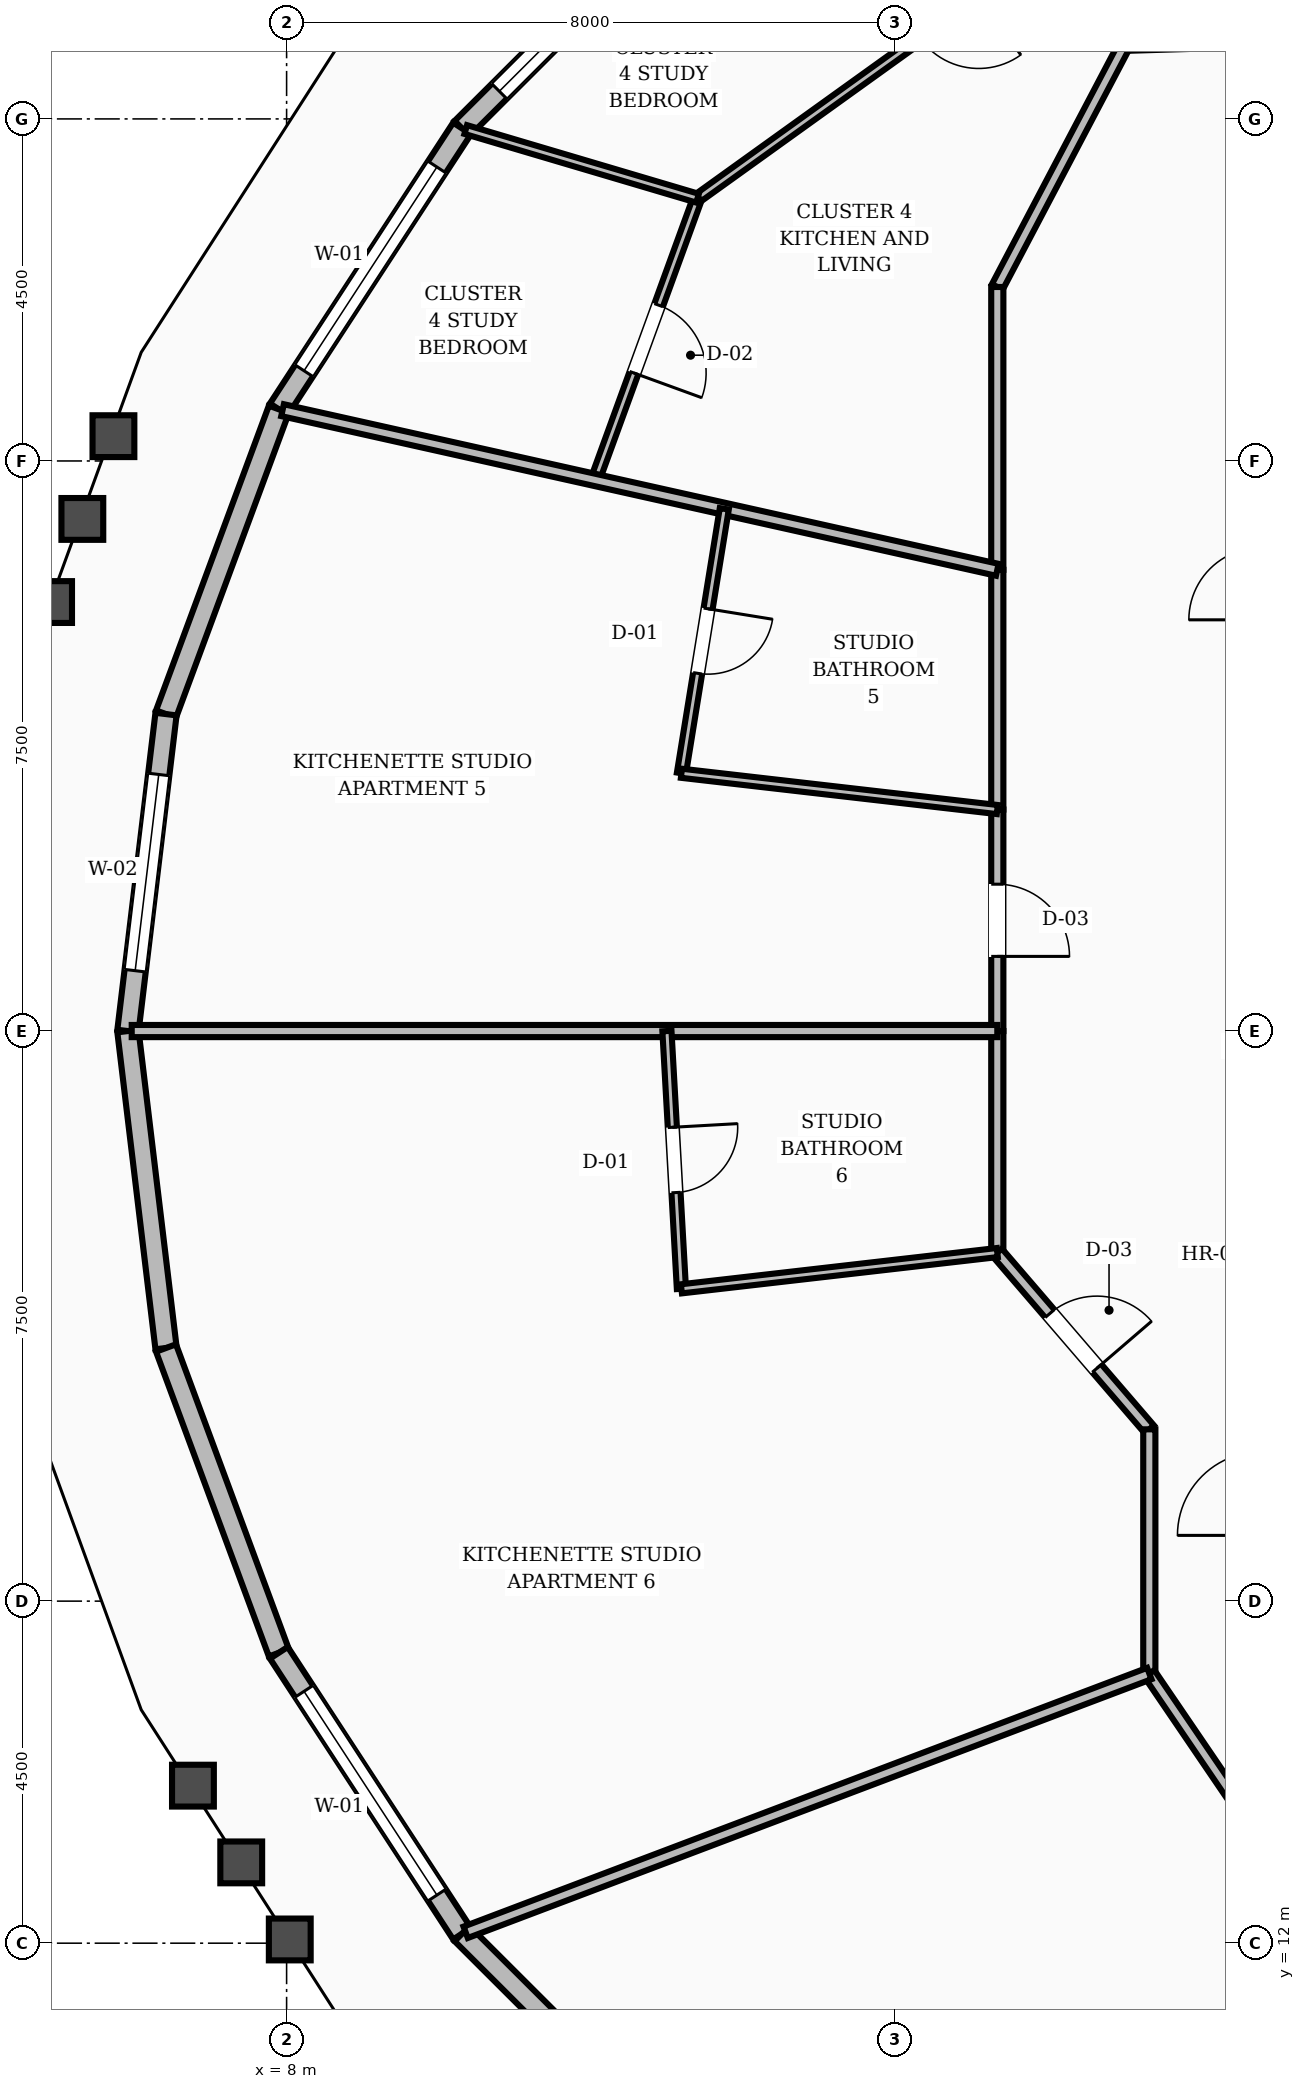
"""IFC4 building model, lengths in metres.
Left out: names, types, materials, properties, quantities, classifications, styles, units other than length and angle.
Written with IfcOpenShell. Run it as: python <this file> out.ifc"""

import sys

from ifc_helpers import new_model, si_unit, direction, frame, frame_2d, origin, place, context, subcontext, project, spatial, rectangle, extrude, element, fill, save


model = new_model("IFC4")
c1 = context("Model", 3, precision=1e-05, world=origin(), true_north=direction((0.0, 1.0)))
c2 = subcontext(c1, "Body", "Model", "MODEL_VIEW")
j1 = project(units=[si_unit("LENGTHUNIT", "METRE"), si_unit("PLANEANGLEUNIT", "RADIAN")], contexts=[c1])
p1 = place(None, origin())
s1 = spatial("IfcSite", under=j1, at=p1, CompositionType="ELEMENT")
p2 = place(p1, origin())
s2 = spatial("IfcBuilding", under=s1, at=p2, CompositionType="ELEMENT")
p3 = place(p2, frame((0.0, 0.0, 171.2)))
s3 = spatial("IfcBuildingStorey", under=s2, at=p3, CompositionType="ELEMENT", Elevation=171.2)
p4 = place(p3, frame((13.553, 39.113, 0.0), z_axis=(0.0, 0.0, 1.0), x_axis=(-0.707692376563, -0.706520700443, 0.0)))
e1 = element("IfcWall", 1, at=p4, inside=s3, PredefinedType="STANDARD", context=c2, shape_type="SweptSolid", body=[
    extrude(rectangle(XDim=4.584, YDim=0.28, at=frame_2d((2.292, 0.0))), origin(), (0.0, 0.0, 1.0), 2.82),
])
p5 = place(p4, frame((0.692, 0.0, 0.8)))
e2 = element("IfcOpeningElement", 2, at=p5, cuts=e1, PredefinedType="OPENING", context=c2, shape_type="SweptSolid", body=[
    extrude(rectangle(XDim=3.2, YDim=1.65, at=frame_2d((1.6, 0.825))), frame((0.0, 0.15, 0.0), z_axis=(0.0, -1.0, 0.0), x_axis=(1.0, 0.0, 0.0)), (0.0, 0.0, 1.0), 0.3),
])
p6 = place(p3, frame((10.309, 35.875, 0.0), z_axis=(0.0, 0.0, 1.0), x_axis=(-0.546411241489, -0.837517017841, 0.0)))
e3 = element("IfcWall", 3, at=p6, inside=s3, PredefinedType="STANDARD", context=c2, shape_type="SweptSolid", body=[
    extrude(rectangle(XDim=4.412, YDim=0.28, at=frame_2d((2.206, 0.0))), origin(), (0.0, 0.0, 1.0), 2.82),
])
p7 = place(p6, frame((0.606, 0.0, 0.8)))
e4 = element("IfcOpeningElement", 4, at=p7, cuts=e3, PredefinedType="OPENING", context=c2, shape_type="SweptSolid", body=[
    extrude(rectangle(XDim=3.2, YDim=1.65, at=frame_2d((1.6, 0.825))), frame((0.0, 0.15, 0.0), z_axis=(0.0, -1.0, 0.0), x_axis=(1.0, 0.0, 0.0)), (0.0, 0.0, 1.0), 0.3),
])
p8 = place(p3, frame((7.898, 32.179, 0.0), z_axis=(0.0, 0.0, 1.0), x_axis=(-0.347202759563, -0.937790085121, 0.0)))
e5 = element("IfcWall", 5, at=p8, inside=s3, PredefinedType="STANDARD", context=c2, shape_type="SweptSolid", body=[
    extrude(rectangle(XDim=4.275, YDim=0.28, at=frame_2d((2.138, 0.0))), origin(), (0.0, 0.0, 1.0), 2.82),
])
p9 = place(p3, frame((6.414, 28.17, 0.0), z_axis=(0.0, 0.0, 1.0), x_axis=(-0.119397354427, -0.992846549954, 0.0)))
e6 = element("IfcWall", 6, at=p9, inside=s3, PredefinedType="STANDARD", context=c2, shape_type="SweptSolid", body=[
    extrude(rectangle(XDim=4.2, YDim=0.28, at=frame_2d((2.1, 0.0))), origin(), (0.0, 0.0, 1.0), 2.82),
])
p10 = place(p9, frame((0.8, 0.0, 0.8)))
e7 = element("IfcOpeningElement", 7, at=p10, cuts=e6, PredefinedType="OPENING", context=c2, shape_type="SweptSolid", body=[
    extrude(rectangle(XDim=2.6, YDim=1.65, at=frame_2d((1.3, 0.825))), frame((0.0, 0.15, 0.0), z_axis=(0.0, -1.0, 0.0), x_axis=(1.0, 0.0, 0.0)), (0.0, 0.0, 1.0), 0.3),
])
p11 = place(p3, frame((5.912, 24.0, 0.0), z_axis=(0.0, 0.0, 1.0), x_axis=(0.119397354427, -0.992846549954, 0.0)))
e8 = element("IfcWall", 8, at=p11, inside=s3, PredefinedType="STANDARD", context=c2, shape_type="SweptSolid", body=[
    extrude(rectangle(XDim=4.2, YDim=0.28, at=frame_2d((2.1, 0.0))), origin(), (0.0, 0.0, 1.0), 2.82),
])
p12 = place(p3, frame((6.414, 19.83, 0.0), z_axis=(0.0, 0.0, 1.0), x_axis=(0.347202759563, -0.937790085121, 0.0)))
e9 = element("IfcWall", 9, at=p12, inside=s3, PredefinedType="STANDARD", context=c2, shape_type="SweptSolid", body=[
    extrude(rectangle(XDim=4.275, YDim=0.28, at=frame_2d((2.138, 0.0))), origin(), (0.0, 0.0, 1.0), 2.82),
])
p13 = place(p3, frame((7.898, 15.821, 0.0), z_axis=(0.0, 0.0, 1.0), x_axis=(0.546411241489, -0.837517017841, 0.0)))
e10 = element("IfcWall", 10, at=p13, inside=s3, PredefinedType="STANDARD", context=c2, shape_type="SweptSolid", body=[
    extrude(rectangle(XDim=4.412, YDim=0.28, at=frame_2d((2.206, 0.0))), origin(), (0.0, 0.0, 1.0), 2.82),
])
p14 = place(p13, frame((0.606, 0.0, 0.8)))
e11 = element("IfcOpeningElement", 11, at=p14, cuts=e10, PredefinedType="OPENING", context=c2, shape_type="SweptSolid", body=[
    extrude(rectangle(XDim=3.2, YDim=1.65, at=frame_2d((1.6, 0.825))), frame((0.0, 0.15, 0.0), z_axis=(0.0, -1.0, 0.0), x_axis=(1.0, 0.0, 0.0)), (0.0, 0.0, 1.0), 0.3),
])
p15 = place(p3, frame((10.309, 12.125, 0.0), z_axis=(0.0, 0.0, 1.0), x_axis=(0.707692376563, -0.706520700443, 0.0)))
e12 = element("IfcWall", 12, at=p15, inside=s3, PredefinedType="STANDARD", context=c2, shape_type="SweptSolid", body=[
    extrude(rectangle(XDim=4.584, YDim=0.28, at=frame_2d((2.292, 0.0))), origin(), (0.0, 0.0, 1.0), 2.82),
])
p16 = place(p3, frame((19.025, 36.975, 0.0), z_axis=(0.0, 0.0, 1.0), x_axis=(-0.46527115782, -0.885168204185, 0.0)))
e13 = element("IfcWall", 13, at=p16, inside=s3, PredefinedType="SOLIDWALL", context=c2, shape_type="SweptSolid", body=[
    extrude(rectangle(XDim=3.6, YDim=0.16, at=frame_2d((1.8, 0.0))), origin(), (0.0, 0.0, 1.0), 2.8),
])
p17 = place(p3, frame((17.35, 33.789, 0.0), z_axis=(0.0, 0.0, 1.0), x_axis=(0.0, -1.0, 0.0)))
e14 = element("IfcWall", 14, at=p17, inside=s3, PredefinedType="SOLIDWALL", context=c2, shape_type="SweptSolid", body=[
    extrude(rectangle(XDim=3.721, YDim=0.16, at=frame_2d((1.86, 0.0))), origin(), (0.0, 0.0, 1.0), 2.8),
])
p18 = place(p3, frame((17.35, 30.068, 0.0), z_axis=(0.0, 0.0, 1.0), x_axis=(0.0, -1.0, 0.0)))
e15 = element("IfcWall", 15, at=p18, inside=s3, PredefinedType="SOLIDWALL", context=c2, shape_type="SweptSolid", body=[
    extrude(rectangle(XDim=3.154, YDim=0.16, at=frame_2d((1.577, 0.0))), origin(), (0.0, 0.0, 1.0), 2.8),
])
p19 = place(p3, frame((17.35, 26.914, 0.0), z_axis=(0.0, 0.0, 1.0), x_axis=(0.0, -1.0, 0.0)))
e16 = element("IfcWall", 16, at=p19, inside=s3, PredefinedType="SOLIDWALL", context=c2, shape_type="SweptSolid", body=[
    extrude(rectangle(XDim=2.914, YDim=0.16, at=frame_2d((1.457, 0.0))), origin(), (0.0, 0.0, 1.0), 2.8),
])
p20 = place(p19, frame((0.982, 0.0, 0.0)))
e17 = element("IfcOpeningElement", 17, at=p20, cuts=e16, PredefinedType="OPENING", context=c2, shape_type="SweptSolid", body=[
    extrude(rectangle(XDim=0.95, YDim=2.1, at=frame_2d((0.475, 1.05))), frame((0.0, 0.09, 0.0), z_axis=(0.0, -1.0, 0.0), x_axis=(1.0, 0.0, 0.0)), (0.0, 0.0, 1.0), 0.18),
])
p21 = place(p3, frame((17.35, 24.0, 0.0), z_axis=(0.0, 0.0, 1.0), x_axis=(0.0, -1.0, 0.0)))
e18 = element("IfcWall", 18, at=p21, inside=s3, PredefinedType="SOLIDWALL", context=c2, shape_type="SweptSolid", body=[
    extrude(rectangle(XDim=2.914, YDim=0.16, at=frame_2d((1.457, 0.0))), origin(), (0.0, 0.0, 1.0), 2.8),
])
p22 = place(p3, frame((17.35, 21.086, 0.0), z_axis=(0.0, 0.0, 1.0), x_axis=(0.652022797448, -0.758199361388, 0.0)))
e19 = element("IfcWall", 19, at=p22, inside=s3, PredefinedType="SOLIDWALL", context=c2, shape_type="SweptSolid", body=[
    extrude(rectangle(XDim=3.067, YDim=0.16, at=frame_2d((1.534, 0.0))), origin(), (0.0, 0.0, 1.0), 2.8),
])
p23 = place(p22, frame((1.059, 0.0, 0.0)))
e20 = element("IfcOpeningElement", 20, at=p23, cuts=e19, PredefinedType="OPENING", context=c2, shape_type="SweptSolid", body=[
    extrude(rectangle(XDim=0.95, YDim=2.1, at=frame_2d((0.475, 1.05))), frame((0.0, 0.09, 0.0), z_axis=(0.0, -1.0, 0.0), x_axis=(1.0, 0.0, 0.0)), (0.0, 0.0, 1.0), 0.18),
])
p24 = place(p3, frame((19.35, 18.76, 0.0), z_axis=(0.0, 0.0, 1.0), x_axis=(0.0, -1.0, 0.0)))
e21 = element("IfcWall", 21, at=p24, inside=s3, PredefinedType="SOLIDWALL", context=c2, shape_type="SweptSolid", body=[
    extrude(rectangle(XDim=3.213, YDim=0.16, at=frame_2d((1.606, 0.0))), origin(), (0.0, 0.0, 1.0), 2.8),
])
p25 = place(p3, frame((19.35, 15.548, 0.0), z_axis=(0.0, 0.0, 1.0), x_axis=(0.562674669208, -0.826678423955, 0.0)))
e22 = element("IfcWall", 22, at=p25, inside=s3, PredefinedType="SOLIDWALL", context=c2, shape_type="SweptSolid", body=[
    extrude(rectangle(XDim=3.021, YDim=0.16, at=frame_2d((1.511, 0.0))), origin(), (0.0, 0.0, 1.0), 2.8),
])
p26 = place(p3, frame((20.032, 39.716, 0.0), z_axis=(0.0, 0.0, 1.0), x_axis=(-0.812167375512, -0.58342450596, 0.0)))
e23 = element("IfcWall", 23, at=p26, inside=s3, PredefinedType="PARTITIONING", context=c2, shape_type="SweptSolid", body=[
    extrude(rectangle(XDim=8.157, YDim=0.12, at=frame_2d((4.079, 0.0))), origin(), (0.0, 0.0, 1.0), 2.8),
])
p27 = place(p26, frame((3.604, 0.0, 0.0)))
e24 = element("IfcOpeningElement", 24, at=p27, cuts=e23, PredefinedType="OPENING", context=c2, shape_type="SweptSolid", body=[
    extrude(rectangle(XDim=0.95, YDim=2.1, at=frame_2d((0.475, 1.05))), frame((0.0, 0.07, 0.0), z_axis=(0.0, -1.0, 0.0), x_axis=(1.0, 0.0, 0.0)), (0.0, 0.0, 1.0), 0.14),
])
p28 = place(p3, frame((13.407, 34.957, 0.0), z_axis=(0.0, 0.0, 1.0), x_axis=(-0.342269779856, -0.939601722964, 0.0)))
e25 = element("IfcWall", 25, at=p28, inside=s3, PredefinedType="PARTITIONING", context=c2, shape_type="SweptSolid", body=[
    extrude(rectangle(XDim=3.945, YDim=0.12, at=frame_2d((1.972, 0.0))), origin(), (0.0, 0.0, 1.0), 2.8),
])
p29 = place(p28, frame((1.497, 0.0, 0.0)))
e26 = element("IfcOpeningElement", 26, at=p29, cuts=e25, PredefinedType="OPENING", context=c2, shape_type="SweptSolid", body=[
    extrude(rectangle(XDim=0.95, YDim=2.1, at=frame_2d((0.475, 1.05))), frame((0.0, 0.07, 0.0), z_axis=(0.0, -1.0, 0.0), x_axis=(1.0, 0.0, 0.0)), (0.0, 0.0, 1.0), 0.14),
])
p30 = place(p3, frame((13.407, 34.957, 0.0), z_axis=(0.0, 0.0, 1.0), x_axis=(-0.958817465397, 0.284023006198, 0.0)))
e27 = element("IfcWall", 27, at=p30, inside=s3, PredefinedType="PARTITIONING", context=c2, shape_type="SweptSolid", body=[
    extrude(rectangle(XDim=3.181, YDim=0.12, at=frame_2d((1.591, 0.0))), origin(), (0.0, 0.0, 1.0), 2.8),
])
p31 = place(p3, frame((17.35, 30.068, 0.0), z_axis=(0.0, 0.0, 1.0), x_axis=(-0.975950982727, 0.217990089947, 0.0)))
e28 = element("IfcWall", 28, at=p31, inside=s3, PredefinedType="SOLIDWALL", context=c2, shape_type="SweptSolid", body=[
    extrude(rectangle(XDim=9.635, YDim=0.16, at=frame_2d((4.817, 0.0))), origin(), (0.0, 0.0, 1.0), 2.8),
])
p32 = place(p3, frame((13.758, 30.87, 0.0), z_axis=(0.0, 0.0, 1.0), x_axis=(-0.160083927962, -0.987103406948, 0.0)))
e29 = element("IfcWall", 29, at=p32, inside=s3, PredefinedType="PARTITIONING", context=c2, shape_type="SweptSolid", body=[
    extrude(rectangle(XDim=3.524, YDim=0.12, at=frame_2d((1.762, 0.0))), origin(), (0.0, 0.0, 1.0), 2.8),
])
p33 = place(p32, frame((1.332, 0.0, 0.0)))
e30 = element("IfcOpeningElement", 30, at=p33, cuts=e29, PredefinedType="OPENING", context=c2, shape_type="SweptSolid", body=[
    extrude(rectangle(XDim=0.86, YDim=2.1, at=frame_2d((0.43, 1.05))), frame((0.0, 0.07, 0.0), z_axis=(0.0, -1.0, 0.0), x_axis=(1.0, 0.0, 0.0)), (0.0, 0.0, 1.0), 0.14),
])
p34 = place(p3, frame((17.35, 26.914, 0.0), z_axis=(0.0, 0.0, 1.0), x_axis=(-0.993469881573, 0.114094673, 0.0)))
e31 = element("IfcWall", 31, at=p34, inside=s3, PredefinedType="PARTITIONING", context=c2, shape_type="SweptSolid", body=[
    extrude(rectangle(XDim=4.183, YDim=0.12, at=frame_2d((2.092, 0.0))), origin(), (0.0, 0.0, 1.0), 2.8),
])
p35 = place(p3, frame((17.35, 24.0, 0.0), z_axis=(0.0, 0.0, 1.0), x_axis=(-1.0, 0.0, 0.0)))
e32 = element("IfcWall", 32, at=p35, inside=s3, PredefinedType="SOLIDWALL", context=c2, shape_type="SweptSolid", body=[
    extrude(rectangle(XDim=11.388, YDim=0.16, at=frame_2d((5.694, 0.0))), origin(), (0.0, 0.0, 1.0), 2.8),
])
p36 = place(p3, frame((13.004, 24.0, 0.0), z_axis=(0.0, 0.0, 1.0), x_axis=(0.056063151341, -0.99842722472, 0.0)))
e33 = element("IfcWall", 33, at=p36, inside=s3, PredefinedType="PARTITIONING", context=c2, shape_type="SweptSolid", body=[
    extrude(rectangle(XDim=3.397, YDim=0.12, at=frame_2d((1.698, 0.0))), origin(), (0.0, 0.0, 1.0), 2.8),
])
p37 = place(p36, frame((1.268, 0.0, 0.0)))
e34 = element("IfcOpeningElement", 34, at=p37, cuts=e33, PredefinedType="OPENING", context=c2, shape_type="SweptSolid", body=[
    extrude(rectangle(XDim=0.86, YDim=2.1, at=frame_2d((0.43, 1.05))), frame((0.0, 0.07, 0.0), z_axis=(0.0, -1.0, 0.0), x_axis=(1.0, 0.0, 0.0)), (0.0, 0.0, 1.0), 0.14),
])
p38 = place(p3, frame((17.35, 21.086, 0.0), z_axis=(0.0, 0.0, 1.0), x_axis=(-0.993469881573, -0.114094673, 0.0)))
e35 = element("IfcWall", 35, at=p38, inside=s3, PredefinedType="PARTITIONING", context=c2, shape_type="SweptSolid", body=[
    extrude(rectangle(XDim=4.183, YDim=0.12, at=frame_2d((2.092, 0.0))), origin(), (0.0, 0.0, 1.0), 2.8),
])
p39 = place(p3, frame((19.35, 15.548, 0.0), z_axis=(0.0, 0.0, 1.0), x_axis=(-0.935251280016, -0.353984523996, 0.0)))
e36 = element("IfcWall", 36, at=p39, inside=s3, PredefinedType="SOLIDWALL", context=c2, shape_type="SweptSolid", body=[
    extrude(rectangle(XDim=9.617, YDim=0.16, at=frame_2d((4.809, 0.0))), origin(), (0.0, 0.0, 1.0), 2.8),
])
p40 = place(p5, origin())
e37 = element("IfcWindow", 37, at=p40, inside=s3, PartitioningType="SINGLE_PANEL", PredefinedType="WINDOW", context=c2, shape_type="SweptSolid", body=[
    extrude(rectangle(XDim=3.2, YDim=1.65, at=frame_2d((1.6, 0.825))), frame((0.0, 0.03, 0.0), z_axis=(0.0, -1.0, 0.0), x_axis=(1.0, 0.0, 0.0)), (0.0, 0.0, 1.0), 0.06),
])
fill(e2, e37)
p41 = place(p7, origin())
e38 = element("IfcWindow", 38, at=p41, inside=s3, PartitioningType="SINGLE_PANEL", PredefinedType="WINDOW", context=c2, shape_type="SweptSolid", body=[
    extrude(rectangle(XDim=3.2, YDim=1.65, at=frame_2d((1.6, 0.825))), frame((0.0, 0.03, 0.0), z_axis=(0.0, -1.0, 0.0), x_axis=(1.0, 0.0, 0.0)), (0.0, 0.0, 1.0), 0.06),
])
fill(e4, e38)
p42 = place(p10, origin())
e39 = element("IfcWindow", 39, at=p42, inside=s3, PartitioningType="SINGLE_PANEL", PredefinedType="WINDOW", context=c2, shape_type="SweptSolid", body=[
    extrude(rectangle(XDim=2.6, YDim=1.65, at=frame_2d((1.3, 0.825))), frame((0.0, 0.03, 0.0), z_axis=(0.0, -1.0, 0.0), x_axis=(1.0, 0.0, 0.0)), (0.0, 0.0, 1.0), 0.06),
])
fill(e7, e39)
p43 = place(p14, origin())
e40 = element("IfcWindow", 40, at=p43, inside=s3, PartitioningType="SINGLE_PANEL", PredefinedType="WINDOW", context=c2, shape_type="SweptSolid", body=[
    extrude(rectangle(XDim=3.2, YDim=1.65, at=frame_2d((1.6, 0.825))), frame((0.0, 0.03, 0.0), z_axis=(0.0, -1.0, 0.0), x_axis=(1.0, 0.0, 0.0)), (0.0, 0.0, 1.0), 0.06),
])
fill(e11, e40)
p44 = place(p29, origin())
e41 = element("IfcDoor", 41, at=p44, inside=s3, OperationType="SINGLE_SWING_RIGHT", PredefinedType="DOOR", context=c2, shape_type="SweptSolid", body=[
    extrude(rectangle(XDim=0.95, YDim=2.1, at=frame_2d((0.475, 1.05))), frame((0.0, 0.025, 0.0), z_axis=(0.0, -1.0, 0.0), x_axis=(1.0, 0.0, 0.0)), (0.0, 0.0, 1.0), 0.05),
])
fill(e26, e41)
p45 = place(p33, origin())
e42 = element("IfcDoor", 42, at=p45, inside=s3, OperationType="SINGLE_SWING_LEFT", PredefinedType="DOOR", context=c2, shape_type="SweptSolid", body=[
    extrude(rectangle(XDim=0.86, YDim=2.1, at=frame_2d((0.43, 1.05))), frame((0.0, 0.025, 0.0), z_axis=(0.0, -1.0, 0.0), x_axis=(1.0, 0.0, 0.0)), (0.0, 0.0, 1.0), 0.05),
])
fill(e30, e42)
p46 = place(p20, origin())
e43 = element("IfcDoor", 43, at=p46, inside=s3, OperationType="SINGLE_SWING_RIGHT", PredefinedType="DOOR", context=c2, shape_type="SweptSolid", body=[
    extrude(rectangle(XDim=0.95, YDim=2.1, at=frame_2d((0.475, 1.05))), frame((0.0, 0.025, 0.0), z_axis=(0.0, -1.0, 0.0), x_axis=(1.0, 0.0, 0.0)), (0.0, 0.0, 1.0), 0.05),
])
fill(e17, e43)
p47 = place(p37, origin())
e44 = element("IfcDoor", 44, at=p47, inside=s3, OperationType="SINGLE_SWING_LEFT", PredefinedType="DOOR", context=c2, shape_type="SweptSolid", body=[
    extrude(rectangle(XDim=0.86, YDim=2.1, at=frame_2d((0.43, 1.05))), frame((0.0, 0.025, 0.0), z_axis=(0.0, -1.0, 0.0), x_axis=(1.0, 0.0, 0.0)), (0.0, 0.0, 1.0), 0.05),
])
fill(e34, e44)
p48 = place(p23, origin())
e45 = element("IfcDoor", 45, at=p48, inside=s3, OperationType="SINGLE_SWING_RIGHT", PredefinedType="DOOR", context=c2, shape_type="SweptSolid", body=[
    extrude(rectangle(XDim=0.95, YDim=2.1, at=frame_2d((0.475, 1.05))), frame((0.0, 0.025, 0.0), z_axis=(0.0, -1.0, 0.0), x_axis=(1.0, 0.0, 0.0)), (0.0, 0.0, 1.0), 0.05),
])
fill(e20, e45)
save(model, sys.argv[1])
